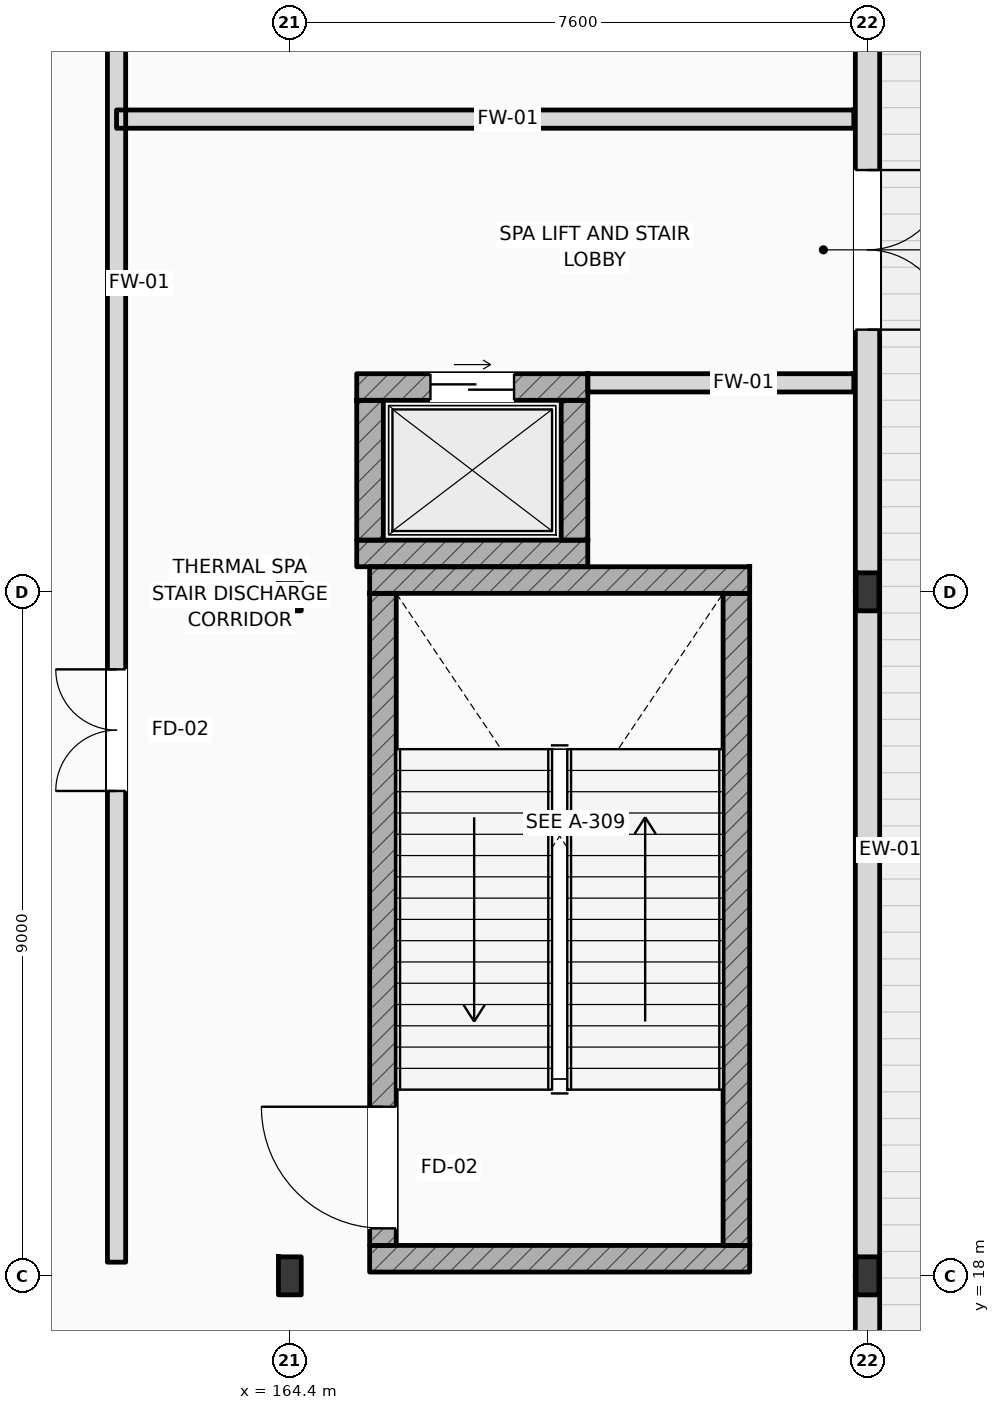
"""IFC4 building model, lengths in metres.
Left out: names, types, materials, properties, quantities, classifications, styles, units other than length and angle.
Written with IfcOpenShell. Run it as: python <this file> out.ifc"""

import sys

from ifc_helpers import new_model, si_unit, direction, frame, frame_2d, origin, origin_2d, place, context, subcontext, project, spatial, rectangle, i_section, extrude, element, fill, save


model = new_model("IFC4")
c1 = context("Model", 3, precision=1e-05, world=origin(), true_north=direction((0.0, 1.0)))
c2 = subcontext(c1, "Body", "Model", "MODEL_VIEW")
j1 = project(units=[si_unit("LENGTHUNIT", "METRE"), si_unit("PLANEANGLEUNIT", "RADIAN")], contexts=[c1])
p1 = place(None, origin())
s1 = spatial("IfcSite", under=j1, at=p1, CompositionType="ELEMENT")
p2 = place(p1, origin())
s2 = spatial("IfcBuilding", under=s1, at=p2, CompositionType="ELEMENT")
p3 = place(p2, origin())
s3 = spatial("IfcBuildingStorey", under=s2, at=p3, CompositionType="ELEMENT", Elevation=0.0)
for number, where, z_axis, x_axis in (
    (1, (164.4, 18.0, 0.0), (0.0, 0.0, 1.0), (1.0, 0.0, 0.0)),
    (2, (164.4, 27.0, 0.0), (0.0, 0.0, 1.0), (1.0, 0.0, 0.0)),
    (3, (172.0, 18.0, 0.0), (0.0, 0.0, 1.0), (1.0, 0.0, 0.0)),
    (4, (172.0, 27.0, 0.0), (0.0, 0.0, 1.0), (1.0, 0.0, 0.0)),
):
    element("IfcColumn", number, at=place(p3, frame(where, z_axis=z_axis, x_axis=x_axis)), inside=s3, PredefinedType="COLUMN", context=c2, shape_type="SweptSolid", body=[
        extrude(i_section(OverallWidth=0.3, OverallDepth=0.5, WebThickness=0.014, FlangeThickness=0.028, FilletRadius=0.027, at=origin_2d()), origin(), (0.0, 0.0, 1.0), 6.0),
    ])
for number, where, z_axis, x_axis in (
    (5, (165.45, 27.155, 0.0), (0.0, 0.0, 1.0), (1.0, 0.0, 0.0)),
    (6, (165.45, 18.225, 0.0), (0.0, 0.0, 1.0), (1.0, 0.0, 0.0)),
):
    element("IfcWall", number, at=place(p3, frame(where, z_axis=z_axis, x_axis=x_axis)), inside=s3, PredefinedType="SHEAR", context=c2, shape_type="SweptSolid", body=[
        extrude(rectangle(XDim=5.0, YDim=0.35, at=frame_2d((2.5, 0.0))), origin(), (0.0, 0.0, 1.0), 6.0),
    ])
p4 = place(p3, frame((165.625, 18.4, 0.0), z_axis=(0.0, 0.0, 1.0), x_axis=(0.0, 1.0, 0.0)))
e7 = element("IfcWall", 7, at=p4, inside=s3, PredefinedType="SHEAR", context=c2, shape_type="SweptSolid", body=[
    extrude(rectangle(XDim=8.58, YDim=0.35, at=frame_2d((4.29, 0.0))), origin(), (0.0, 0.0, 1.0), 6.0),
])
p5 = place(p4, frame((0.225, 0.0, 0.0)))
e8 = element("IfcOpeningElement", 8, at=p5, cuts=e7, PredefinedType="OPENING", context=c2, shape_type="SweptSolid", body=[
    extrude(rectangle(XDim=1.6, YDim=2.2, at=frame_2d((0.8, 1.1))), frame((0.0, 0.185, 0.0), z_axis=(0.0, -1.0, 0.0), x_axis=(1.0, 0.0, 0.0)), (0.0, 0.0, 1.0), 0.37),
])
p6 = place(p3, frame((170.275, 18.4, 0.0), z_axis=(0.0, 0.0, 1.0), x_axis=(0.0, 1.0, 0.0)))
e9 = element("IfcWall", 9, at=p6, inside=s3, PredefinedType="SHEAR", context=c2, shape_type="SweptSolid", body=[
    extrude(rectangle(XDim=8.58, YDim=0.35, at=frame_2d((4.29, 0.0))), origin(), (0.0, 0.0, 1.0), 6.0),
])
p7 = place(p3, frame((172.0, 9.0, 0.0), z_axis=(0.0, 0.0, 1.0), x_axis=(0.0, 1.0, 0.0)))
e10 = element("IfcWall", 10, at=p7, inside=s3, PredefinedType="STANDARD", context=c2, shape_type="SweptSolid", body=[
    extrude(rectangle(XDim=9.0, YDim=0.32, at=frame_2d((4.5, 0.0))), origin(), (0.0, 0.0, 1.0), 5.2),
])
p8 = place(p7, frame((1.25, 0.0, 0.0)))
e11 = element("IfcOpeningElement", 11, at=p8, cuts=e10, PredefinedType="OPENING", context=c2, shape_type="SweptSolid", body=[
    extrude(rectangle(XDim=6.5, YDim=3.2, at=frame_2d((3.25, 1.6))), frame((0.0, 0.17, 0.0), z_axis=(0.0, -1.0, 0.0), x_axis=(1.0, 0.0, 0.0)), (0.0, 0.0, 1.0), 0.34),
])
p9 = place(p3, frame((172.0, 18.0, 0.0), z_axis=(0.0, 0.0, 1.0), x_axis=(0.0, 1.0, 0.0)))
e12 = element("IfcWall", 12, at=p9, inside=s3, PredefinedType="STANDARD", context=c2, shape_type="SweptSolid", body=[
    extrude(rectangle(XDim=9.0, YDim=0.32, at=frame_2d((4.5, 0.0))), origin(), (0.0, 0.0, 1.0), 5.2),
])
p10 = place(p3, frame((172.0, 27.0, 0.0), z_axis=(0.0, 0.0, 1.0), x_axis=(0.0, 1.0, 0.0)))
e13 = element("IfcWall", 13, at=p10, inside=s3, PredefinedType="STANDARD", context=c2, shape_type="SweptSolid", body=[
    extrude(rectangle(XDim=9.0, YDim=0.32, at=frame_2d((4.5, 0.0))), origin(), (0.0, 0.0, 1.0), 5.2),
])
p11 = place(p10, frame((3.45, 0.0, 0.0)))
e14 = element("IfcOpeningElement", 14, at=p11, cuts=e13, PredefinedType="OPENING", context=c2, shape_type="SweptSolid", body=[
    extrude(rectangle(XDim=2.1, YDim=2.25, at=frame_2d((1.05, 1.125))), frame((0.0, 0.17, 0.0), z_axis=(0.0, -1.0, 0.0), x_axis=(1.0, 0.0, 0.0)), (0.0, 0.0, 1.0), 0.34),
])
p12 = place(p3, frame((165.28, 29.695, 0.0), z_axis=(0.0, 0.0, 1.0), x_axis=(1.0, 0.0, 0.0)))
e15 = element("IfcWall", 15, at=p12, inside=s3, PredefinedType="SHEAR", context=c2, shape_type="SweptSolid", body=[
    extrude(rectangle(XDim=3.04, YDim=0.35, at=frame_2d((1.52, 0.0))), origin(), (0.0, 0.0, 1.0), 5.7),
])
p13 = place(p12, frame((0.97, 0.0, 0.0)))
e16 = element("IfcOpeningElement", 16, at=p13, cuts=e15, PredefinedType="OPENING", context=c2, shape_type="SweptSolid", body=[
    extrude(rectangle(XDim=1.1, YDim=2.2, at=frame_2d((0.55, 1.1))), frame((0.0, 0.185, 0.0), z_axis=(0.0, -1.0, 0.0), x_axis=(1.0, 0.0, 0.0)), (0.0, 0.0, 1.0), 0.37),
])
p14 = place(p3, frame((165.28, 27.505, 0.0), z_axis=(0.0, 0.0, 1.0), x_axis=(1.0, 0.0, 0.0)))
e17 = element("IfcWall", 17, at=p14, inside=s3, PredefinedType="SHEAR", context=c2, shape_type="SweptSolid", body=[
    extrude(rectangle(XDim=3.04, YDim=0.35, at=frame_2d((1.52, 0.0))), origin(), (0.0, 0.0, 1.0), 5.7),
])
for number, where, z_axis, x_axis in (
    (18, (165.455, 27.68, 0.0), (0.0, 0.0, 1.0), (0.0, 1.0, 0.0)),
    (19, (168.145, 27.68, 0.0), (0.0, 0.0, 1.0), (0.0, 1.0, 0.0)),
):
    element("IfcWall", number, at=place(p3, frame(where, z_axis=z_axis, x_axis=x_axis)), inside=s3, PredefinedType="SHEAR", context=c2, shape_type="SweptSolid", body=[
        extrude(rectangle(XDim=1.84, YDim=0.35, at=frame_2d((0.92, 0.0))), origin(), (0.0, 0.0, 1.0), 5.7),
    ])
p15 = place(p3, frame((162.12, 18.18, 0.0), z_axis=(0.0, 0.0, 1.0), x_axis=(0.0, 1.0, 0.0)))
e20 = element("IfcWall", 20, at=p15, inside=s3, PredefinedType="STANDARD", context=c2, shape_type="SweptSolid", body=[
    extrude(rectangle(XDim=17.67, YDim=0.24, at=frame_2d((8.835, 0.0))), origin(), (0.0, 0.0, 1.0), 5.7),
])
p16 = place(p15, frame((6.2, 0.0, 0.0)))
e21 = element("IfcOpeningElement", 21, at=p16, cuts=e20, PredefinedType="OPENING", context=c2, shape_type="SweptSolid", body=[
    extrude(rectangle(XDim=1.6, YDim=2.2, at=frame_2d((0.8, 1.1))), frame((0.0, 0.13, 0.0), z_axis=(0.0, -1.0, 0.0), x_axis=(1.0, 0.0, 0.0)), (0.0, 0.0, 1.0), 0.26),
])
p17 = place(p3, frame((162.12, 33.22, 0.0), z_axis=(0.0, 0.0, 1.0), x_axis=(1.0, 0.0, 0.0)))
e22 = element("IfcWall", 22, at=p17, inside=s3, PredefinedType="STANDARD", context=c2, shape_type="SweptSolid", body=[
    extrude(rectangle(XDim=9.7, YDim=0.24, at=frame_2d((4.85, 0.0))), origin(), (0.0, 0.0, 1.0), 5.7),
])
p18 = place(p3, frame((168.32, 29.75, 0.0), z_axis=(0.0, 0.0, 1.0), x_axis=(1.0, 0.0, 0.0)))
e23 = element("IfcWall", 23, at=p18, inside=s3, PredefinedType="STANDARD", context=c2, shape_type="SweptSolid", body=[
    extrude(rectangle(XDim=3.5, YDim=0.24, at=frame_2d((1.75, 0.0))), origin(), (0.0, 0.0, 1.0), 5.7),
])
p19 = place(p11, frame((2.1, 0.0, 0.0), z_axis=(0.0, 0.0, 1.0), x_axis=(-1.0, 0.0, 0.0)))
e24 = element("IfcDoor", 24, at=p19, inside=s3, OperationType="DOUBLE_SWING_LEFT", PredefinedType="DOOR", context=c2, shape_type="SweptSolid", body=[
    extrude(rectangle(XDim=2.1, YDim=2.25, at=frame_2d((1.05, 1.125))), frame((0.0, 0.025, 0.0), z_axis=(0.0, -1.0, 0.0), x_axis=(1.0, 0.0, 0.0)), (0.0, 0.0, 1.0), 0.05),
])
fill(e14, e24)
p20 = place(p5, origin())
e25 = element("IfcDoor", 25, at=p20, inside=s3, OperationType="SINGLE_SWING_RIGHT", PredefinedType="DOOR", context=c2, shape_type="SweptSolid", body=[
    extrude(rectangle(XDim=1.6, YDim=2.2, at=frame_2d((0.8, 1.1))), frame((0.0, 0.025, 0.0), z_axis=(0.0, -1.0, 0.0), x_axis=(1.0, 0.0, 0.0)), (0.0, 0.0, 1.0), 0.05),
])
fill(e8, e25)
p21 = place(p13, origin())
e26 = element("IfcDoor", 26, at=p21, inside=s3, OperationType="SLIDING_TO_LEFT", PredefinedType="DOOR", context=c2, shape_type="SweptSolid", body=[
    extrude(rectangle(XDim=1.1, YDim=2.2, at=frame_2d((0.55, 1.1))), frame((0.0, 0.025, 0.0), z_axis=(0.0, -1.0, 0.0), x_axis=(1.0, 0.0, 0.0)), (0.0, 0.0, 1.0), 0.05),
])
fill(e16, e26)
p22 = place(p16, origin())
e27 = element("IfcDoor", 27, at=p22, inside=s3, OperationType="DOUBLE_SWING_LEFT", PredefinedType="DOOR", context=c2, shape_type="SweptSolid", body=[
    extrude(rectangle(XDim=1.6, YDim=2.2, at=frame_2d((0.8, 1.1))), frame((0.0, 0.025, 0.0), z_axis=(0.0, -1.0, 0.0), x_axis=(1.0, 0.0, 0.0)), (0.0, 0.0, 1.0), 0.05),
])
fill(e21, e27)
save(model, sys.argv[1])
